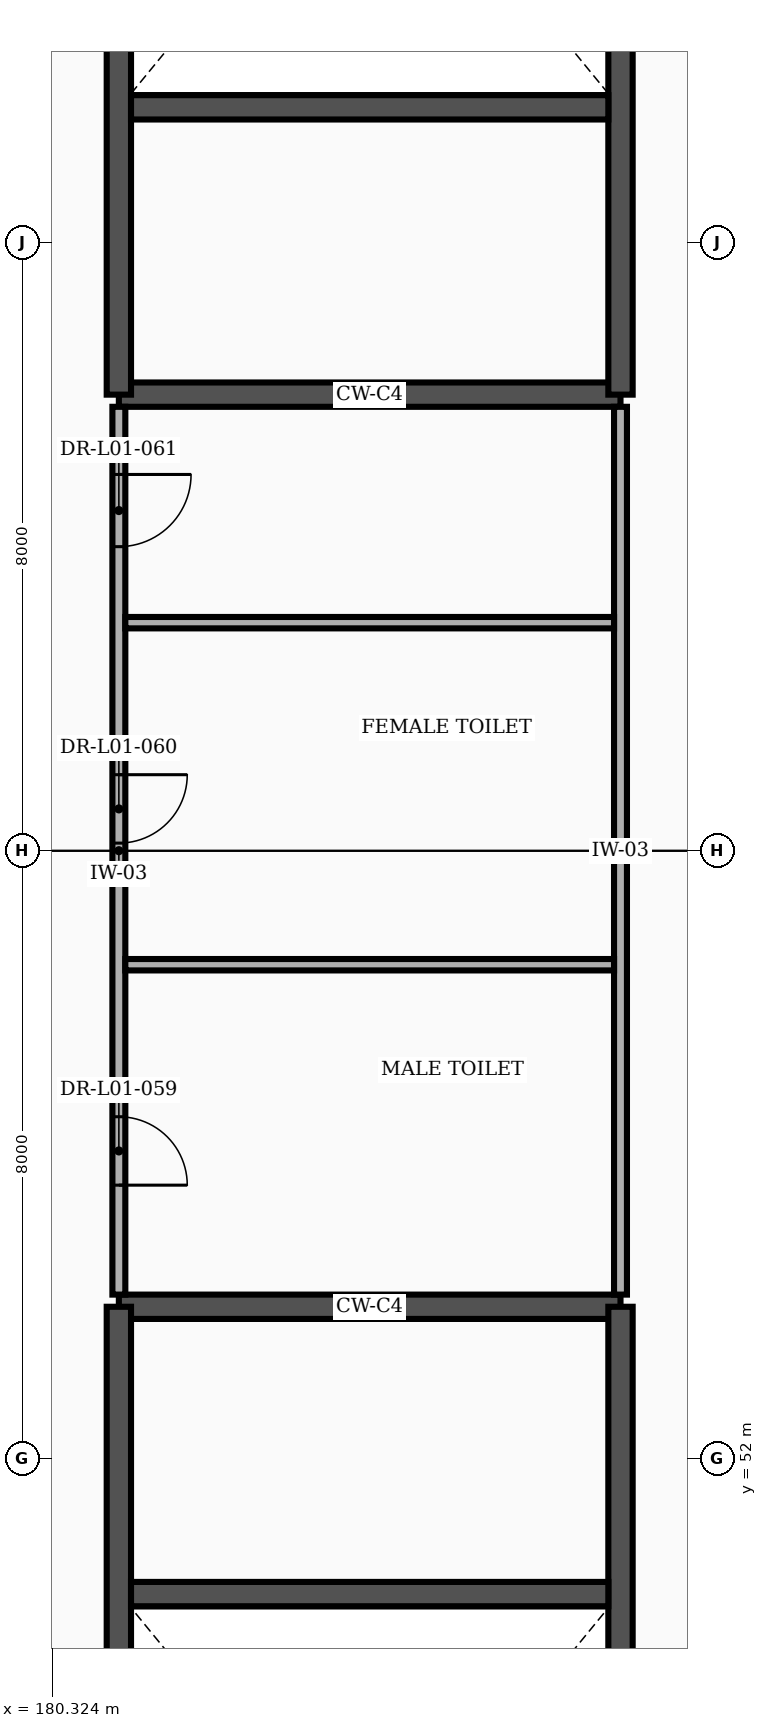
"""IFC4 building model, lengths in metres.
Left out: names, types, materials, properties, quantities, classifications, styles, units other than length and angle.
Written with IfcOpenShell. Run it as: python <this file> out.ifc"""

import sys

from ifc_helpers import new_model, si_unit, direction, frame, frame_2d, origin, place, context, subcontext, project, spatial, rectangle, extrude, element, fill, save


model = new_model("IFC4")
c1 = context("Model", 3, precision=1e-05, world=origin(), true_north=direction((0.0, 1.0)))
c2 = subcontext(c1, "Body", "Model", "MODEL_VIEW")
j1 = project(units=[si_unit("LENGTHUNIT", "METRE"), si_unit("PLANEANGLEUNIT", "RADIAN")], contexts=[c1])
p1 = place(None, origin())
s1 = spatial("IfcSite", under=j1, at=p1, CompositionType="ELEMENT")
p2 = place(p1, origin())
s2 = spatial("IfcBuilding", under=s1, at=p2, CompositionType="ELEMENT")
p3 = place(p2, frame((0.0, 0.0, 6.0)))
s3 = spatial("IfcBuildingStorey", under=s2, at=p3, CompositionType="ELEMENT", Elevation=6.0)
p4 = place(p3, frame((181.2, 54.0, 0.0), z_axis=(0.0, 0.0, 1.0), x_axis=(1.0, 0.0, 0.0)))
e1 = element("IfcWall", 1, at=p4, inside=s3, PredefinedType="SHEAR", context=c2, shape_type="SweptSolid", body=[
    extrude(rectangle(XDim=6.6, YDim=0.32, at=frame_2d((3.3, 0.0))), origin(), (0.0, 0.0, 1.0), 5.15),
])
p5 = place(p3, frame((181.2, 39.4, 0.0), z_axis=(0.0, 0.0, 1.0), x_axis=(0.0, 1.0, 0.0)))
e2 = element("IfcWall", 2, at=p5, inside=s3, PredefinedType="SHEAR", context=c2, shape_type="SweptSolid", body=[
    extrude(rectangle(XDim=14.6, YDim=0.32, at=frame_2d((7.3, 0.0))), origin(), (0.0, 0.0, 1.0), 5.15),
])
p6 = place(p5, frame((0.55, 0.0, 0.0)))
e3 = element("IfcOpeningElement", 3, at=p6, cuts=e2, PredefinedType="OPENING", context=c2, shape_type="SweptSolid", body=[
    extrude(rectangle(XDim=2.4, YDim=2.25, at=frame_2d((1.2, 1.125))), frame((0.0, 0.172, 0.0), z_axis=(0.0, -1.0, 0.0), x_axis=(1.0, 0.0, 0.0)), (0.0, 0.0, 1.0), 0.344),
])
p7 = place(p3, frame((187.8, 39.4, 0.0), z_axis=(0.0, 0.0, 1.0), x_axis=(0.0, 1.0, 0.0)))
e4 = element("IfcWall", 4, at=p7, inside=s3, PredefinedType="SHEAR", context=c2, shape_type="SweptSolid", body=[
    extrude(rectangle(XDim=14.6, YDim=0.32, at=frame_2d((7.3, 0.0))), origin(), (0.0, 0.0, 1.0), 5.15),
])
p8 = place(p3, frame((181.36, 50.22, 0.0), z_axis=(0.0, 0.0, 1.0), x_axis=(1.0, 0.0, 0.0)))
e5 = element("IfcWall", 5, at=p8, inside=s3, PredefinedType="SHEAR", context=c2, shape_type="SweptSolid", body=[
    extrude(rectangle(XDim=6.28, YDim=0.32, at=frame_2d((3.14, 0.0))), origin(), (0.0, 0.0, 1.0), 5.15),
])
p9 = place(p3, frame((181.2, 66.0, 0.0), z_axis=(0.0, 0.0, 1.0), x_axis=(1.0, 0.0, 0.0)))
e6 = element("IfcWall", 6, at=p9, inside=s3, PredefinedType="SHEAR", context=c2, shape_type="SweptSolid", body=[
    extrude(rectangle(XDim=6.6, YDim=0.32, at=frame_2d((3.3, 0.0))), origin(), (0.0, 0.0, 1.0), 5.15),
])
p10 = place(p3, frame((181.2, 66.0, 0.0), z_axis=(0.0, 0.0, 1.0), x_axis=(0.0, 1.0, 0.0)))
e7 = element("IfcWall", 7, at=p10, inside=s3, PredefinedType="SHEAR", context=c2, shape_type="SweptSolid", body=[
    extrude(rectangle(XDim=14.6, YDim=0.32, at=frame_2d((7.3, 0.0))), origin(), (0.0, 0.0, 1.0), 5.15),
])
p11 = place(p10, frame((11.65, 0.0, 0.0)))
e8 = element("IfcOpeningElement", 8, at=p11, cuts=e7, PredefinedType="OPENING", context=c2, shape_type="SweptSolid", body=[
    extrude(rectangle(XDim=2.4, YDim=2.25, at=frame_2d((1.2, 1.125))), frame((0.0, 0.172, 0.0), z_axis=(0.0, -1.0, 0.0), x_axis=(1.0, 0.0, 0.0)), (0.0, 0.0, 1.0), 0.344),
])
p12 = place(p3, frame((187.8, 66.0, 0.0), z_axis=(0.0, 0.0, 1.0), x_axis=(0.0, 1.0, 0.0)))
e9 = element("IfcWall", 9, at=p12, inside=s3, PredefinedType="SHEAR", context=c2, shape_type="SweptSolid", body=[
    extrude(rectangle(XDim=14.6, YDim=0.32, at=frame_2d((7.3, 0.0))), origin(), (0.0, 0.0, 1.0), 5.15),
])
p13 = place(p3, frame((181.36, 69.78, 0.0), z_axis=(0.0, 0.0, 1.0), x_axis=(1.0, 0.0, 0.0)))
e10 = element("IfcWall", 10, at=p13, inside=s3, PredefinedType="SHEAR", context=c2, shape_type="SweptSolid", body=[
    extrude(rectangle(XDim=6.28, YDim=0.32, at=frame_2d((3.14, 0.0))), origin(), (0.0, 0.0, 1.0), 5.15),
])
p14 = place(p3, frame((187.8, 54.16, 0.0), z_axis=(0.0, 0.0, 1.0), x_axis=(0.0, 1.0, 0.0)))
e11 = element("IfcWall", 11, at=p14, inside=s3, PredefinedType="PARTITIONING", context=c2, shape_type="SweptSolid", body=[
    extrude(rectangle(XDim=11.68, YDim=0.17, at=frame_2d((5.84, 0.0))), origin(), (0.0, 0.0, 1.0), 5.15),
])
p15 = place(p3, frame((181.2, 54.16, 0.0), z_axis=(0.0, 0.0, 1.0), x_axis=(0.0, 1.0, 0.0)))
e12 = element("IfcWall", 12, at=p15, inside=s3, PredefinedType="PARTITIONING", context=c2, shape_type="SweptSolid", body=[
    extrude(rectangle(XDim=11.68, YDim=0.17, at=frame_2d((5.84, 0.0))), origin(), (0.0, 0.0, 1.0), 5.15),
])
p16 = place(p15, frame((1.44, 0.0, 0.0)))
e13 = element("IfcOpeningElement", 13, at=p16, cuts=e12, PredefinedType="OPENING", context=c2, shape_type="SweptSolid", body=[
    extrude(rectangle(XDim=0.9, YDim=2.1, at=frame_2d((0.45, 1.05))), frame((0.0, 0.097, 0.0), z_axis=(0.0, -1.0, 0.0), x_axis=(1.0, 0.0, 0.0)), (0.0, 0.0, 1.0), 0.194),
])
p17 = place(p15, frame((5.94, 0.0, 0.0)))
e14 = element("IfcOpeningElement", 14, at=p17, cuts=e12, PredefinedType="OPENING", context=c2, shape_type="SweptSolid", body=[
    extrude(rectangle(XDim=0.9, YDim=2.1, at=frame_2d((0.45, 1.05))), frame((0.0, 0.097, 0.0), z_axis=(0.0, -1.0, 0.0), x_axis=(1.0, 0.0, 0.0)), (0.0, 0.0, 1.0), 0.194),
])
p18 = place(p15, frame((9.84, 0.0, 0.0)))
e15 = element("IfcOpeningElement", 15, at=p18, cuts=e12, PredefinedType="OPENING", context=c2, shape_type="SweptSolid", body=[
    extrude(rectangle(XDim=0.95, YDim=2.1, at=frame_2d((0.475, 1.05))), frame((0.0, 0.097, 0.0), z_axis=(0.0, -1.0, 0.0), x_axis=(1.0, 0.0, 0.0)), (0.0, 0.0, 1.0), 0.194),
])
for number, where, z_axis, x_axis in (
    (16, (181.285, 58.5, 0.0), (0.0, 0.0, 1.0), (1.0, 0.0, 0.0)),
    (17, (181.285, 63.0, 0.0), (0.0, 0.0, 1.0), (1.0, 0.0, 0.0)),
):
    element("IfcWall", number, at=place(p3, frame(where, z_axis=z_axis, x_axis=x_axis)), inside=s3, PredefinedType="PARTITIONING", context=c2, shape_type="SweptSolid", body=[
        extrude(rectangle(XDim=6.43, YDim=0.15, at=frame_2d((3.215, 0.0))), origin(), (0.0, 0.0, 1.0), 5.15),
    ])
p19 = place(p16, frame((0.9, 0.0, 0.0), z_axis=(0.0, 0.0, 1.0), x_axis=(-1.0, 0.0, 0.0)))
e18 = element("IfcDoor", 18, at=p19, inside=s3, OperationType="SINGLE_SWING_RIGHT", PredefinedType="DOOR", context=c2, shape_type="SweptSolid", body=[
    extrude(rectangle(XDim=0.9, YDim=2.1, at=frame_2d((0.45, 1.05))), frame((0.0, 0.025, 0.0), z_axis=(0.0, -1.0, 0.0), x_axis=(1.0, 0.0, 0.0)), (0.0, 0.0, 1.0), 0.05),
])
fill(e13, e18)
p20 = place(p17, frame((0.9, 0.0, 0.0), z_axis=(0.0, 0.0, 1.0), x_axis=(-1.0, 0.0, 0.0)))
e19 = element("IfcDoor", 19, at=p20, inside=s3, OperationType="SINGLE_SWING_LEFT", PredefinedType="DOOR", context=c2, shape_type="SweptSolid", body=[
    extrude(rectangle(XDim=0.9, YDim=2.1, at=frame_2d((0.45, 1.05))), frame((0.0, 0.025, 0.0), z_axis=(0.0, -1.0, 0.0), x_axis=(1.0, 0.0, 0.0)), (0.0, 0.0, 1.0), 0.05),
])
fill(e14, e19)
p21 = place(p18, frame((0.95, 0.0, 0.0), z_axis=(0.0, 0.0, 1.0), x_axis=(-1.0, 0.0, 0.0)))
e20 = element("IfcDoor", 20, at=p21, inside=s3, OperationType="SINGLE_SWING_LEFT", PredefinedType="DOOR", context=c2, shape_type="SweptSolid", body=[
    extrude(rectangle(XDim=0.95, YDim=2.1, at=frame_2d((0.475, 1.05))), frame((0.0, 0.025, 0.0), z_axis=(0.0, -1.0, 0.0), x_axis=(1.0, 0.0, 0.0)), (0.0, 0.0, 1.0), 0.05),
])
fill(e15, e20)
save(model, sys.argv[1])
